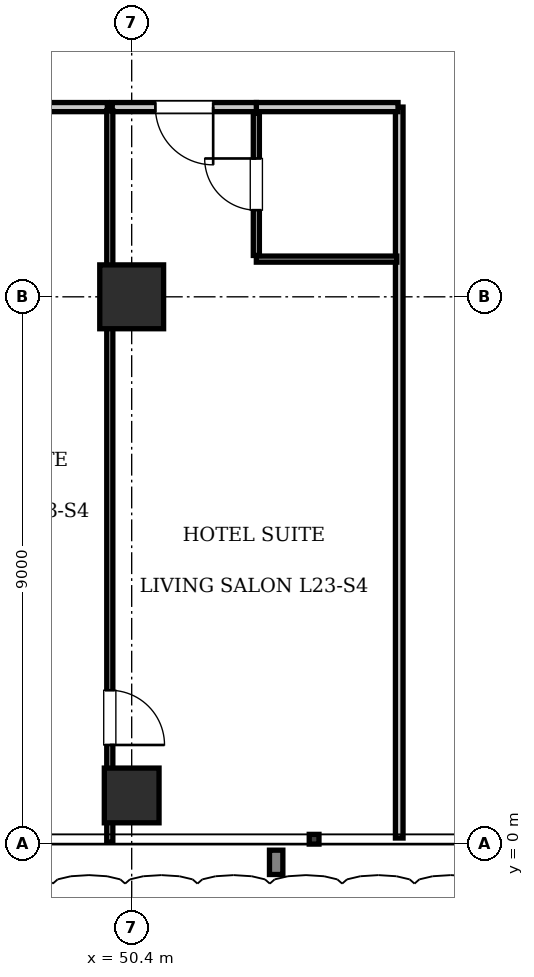
"""IFC4 building model, lengths in metres.
Left out: names, types, materials, properties, quantities, classifications, styles, units other than length and angle.
Written with IfcOpenShell. Run it as: python <this file> out.ifc"""

import sys

from ifc_helpers import new_model, si_unit, direction, frame, frame_2d, origin, origin_2d, place, context, subcontext, project, spatial, rectangle, extrude, element, fill, save


model = new_model("IFC4")
c1 = context("Model", 3, precision=1e-05, world=origin(), true_north=direction((0.0, 1.0)))
c2 = subcontext(c1, "Body", "Model", "MODEL_VIEW")
j1 = project(units=[si_unit("LENGTHUNIT", "METRE"), si_unit("PLANEANGLEUNIT", "RADIAN")], contexts=[c1])
p1 = place(None, origin())
s1 = spatial("IfcSite", under=j1, at=p1, CompositionType="ELEMENT")
p2 = place(p1, origin())
s2 = spatial("IfcBuilding", under=s1, at=p2, CompositionType="ELEMENT")
p3 = place(p2, frame((0.0, 0.0, 96.25)))
s3 = spatial("IfcBuildingStorey", under=s2, at=p3, CompositionType="ELEMENT", Elevation=96.25)
p4 = place(p3, frame((50.4, 9.0, 0.0), z_axis=(0.0, 0.0, 1.0), x_axis=(1.0, 0.0, 0.0)))
e1 = element("IfcColumn", 1, at=p4, inside=s3, PredefinedType="COLUMN", context=c2, shape_type="SweptSolid", body=[
    extrude(rectangle(XDim=1.05, YDim=1.05, at=origin_2d()), origin(), (0.0, 0.0, 1.0), 3.85),
])
p5 = place(p3, frame((50.4, 0.8, 0.0), z_axis=(0.0, 0.0, 1.0), x_axis=(1.0, 0.0, 0.0)))
e2 = element("IfcColumn", 2, at=p5, inside=s3, PredefinedType="COLUMN", context=c2, shape_type="SweptSolid", body=[
    extrude(rectangle(XDim=0.9, YDim=0.9, at=origin_2d()), origin(), (0.0, 0.0, 1.0), 3.85),
])
p6 = place(p3, frame((54.8, 0.1, 0.0), z_axis=(0.0, 0.0, 1.0), x_axis=(0.0, 1.0, 0.0)))
e3 = element("IfcWall", 3, at=p6, inside=s3, PredefinedType="PARTITIONING", context=c2, shape_type="SweptSolid", body=[
    extrude(rectangle(XDim=12.02, YDim=0.125, at=frame_2d((6.01, 0.0))), origin(), (0.0, 0.0, 1.0), 3.61),
])
p7 = place(p3, frame((52.45, 12.12, 0.0), z_axis=(0.0, 0.0, 1.0), x_axis=(1.0, 0.0, 0.0)))
e4 = element("IfcWall", 4, at=p7, inside=s3, PredefinedType="PARTITIONING", context=c2, shape_type="SweptSolid", body=[
    extrude(rectangle(XDim=2.33, YDim=0.15, at=frame_2d((1.165, 0.0))), origin(), (0.0, 0.0, 1.0), 3.61),
])
p8 = place(p3, frame((52.45, 9.62, 0.0), z_axis=(0.0, 0.0, 1.0), x_axis=(1.0, 0.0, 0.0)))
e5 = element("IfcWall", 5, at=p8, inside=s3, PredefinedType="PARTITIONING", context=c2, shape_type="SweptSolid", body=[
    extrude(rectangle(XDim=2.31, YDim=0.1, at=frame_2d((1.155, 0.0))), origin(), (0.0, 0.0, 1.0), 3.61),
])
p9 = place(p3, frame((52.45, 9.68, 0.0), z_axis=(0.0, 0.0, 1.0), x_axis=(0.0, 1.0, 0.0)))
e6 = element("IfcWall", 6, at=p9, inside=s3, PredefinedType="PARTITIONING", context=c2, shape_type="SweptSolid", body=[
    extrude(rectangle(XDim=2.34, YDim=0.1, at=frame_2d((1.17, 0.0))), origin(), (0.0, 0.0, 1.0), 3.61),
])
p10 = place(p9, frame((0.745, 0.0, 0.0)))
e7 = element("IfcOpeningElement", 7, at=p10, cuts=e6, PredefinedType="OPENING", context=c2, shape_type="SweptSolid", body=[
    extrude(rectangle(XDim=0.85, YDim=2.1, at=frame_2d((0.425, 1.05))), frame((0.0, 0.06, 0.0), z_axis=(0.0, -1.0, 0.0), x_axis=(1.0, 0.0, 0.0)), (0.0, 0.0, 1.0), 0.12),
])
p11 = place(p3, frame((46.32, 12.12, 0.0), z_axis=(0.0, 0.0, 1.0), x_axis=(1.0, 0.0, 0.0)))
e8 = element("IfcWall", 8, at=p11, inside=s3, PredefinedType="PARTITIONING", context=c2, shape_type="SweptSolid", body=[
    extrude(rectangle(XDim=3.68, YDim=0.15, at=frame_2d((1.84, 0.0))), origin(), (0.0, 0.0, 1.0), 3.61),
])
p12 = place(p3, frame((50.08, 12.12, 0.0), z_axis=(0.0, 0.0, 1.0), x_axis=(1.0, 0.0, 0.0)))
e9 = element("IfcWall", 9, at=p12, inside=s3, PredefinedType="PARTITIONING", context=c2, shape_type="SweptSolid", body=[
    extrude(rectangle(XDim=2.37, YDim=0.15, at=frame_2d((1.185, 0.0))), origin(), (0.0, 0.0, 1.0), 3.61),
])
p13 = place(p12, frame((0.71, 0.0, 0.0)))
e10 = element("IfcOpeningElement", 10, at=p13, cuts=e9, PredefinedType="OPENING", context=c2, shape_type="SweptSolid", body=[
    extrude(rectangle(XDim=0.95, YDim=2.15, at=frame_2d((0.475, 1.075))), frame((0.0, 0.085, 0.0), z_axis=(0.0, -1.0, 0.0), x_axis=(1.0, 0.0, 0.0)), (0.0, 0.0, 1.0), 0.17),
])
p14 = place(p3, frame((50.04, 0.03, 0.0), z_axis=(0.0, 0.0, 1.0), x_axis=(0.0, 1.0, 0.0)))
e11 = element("IfcWall", 11, at=p14, inside=s3, PredefinedType="PARTITIONING", context=c2, shape_type="SweptSolid", body=[
    extrude(rectangle(XDim=12.03, YDim=0.1, at=frame_2d((6.015, 0.0))), origin(), (0.0, 0.0, 1.0), 3.61),
])
p15 = place(p14, frame((1.6, 0.0, 0.0)))
e12 = element("IfcOpeningElement", 12, at=p15, cuts=e11, PredefinedType="OPENING", context=c2, shape_type="SweptSolid", body=[
    extrude(rectangle(XDim=0.9, YDim=2.1, at=frame_2d((0.45, 1.05))), frame((0.0, 0.06, 0.0), z_axis=(0.0, -1.0, 0.0), x_axis=(1.0, 0.0, 0.0)), (0.0, 0.0, 1.0), 0.12),
])
p16 = place(p10, origin())
e13 = element("IfcDoor", 13, at=p16, inside=s3, OperationType="SINGLE_SWING_RIGHT", PredefinedType="DOOR", context=c2, shape_type="SweptSolid", body=[
    extrude(rectangle(XDim=0.85, YDim=2.1, at=frame_2d((0.425, 1.05))), frame((0.0, 0.025, 0.0), z_axis=(0.0, -1.0, 0.0), x_axis=(1.0, 0.0, 0.0)), (0.0, 0.0, 1.0), 0.05),
])
fill(e7, e13)
p17 = place(p13, frame((0.95, 0.0, 0.0), z_axis=(0.0, 0.0, 1.0), x_axis=(-1.0, 0.0, 0.0)))
e14 = element("IfcDoor", 14, at=p17, inside=s3, OperationType="SINGLE_SWING_LEFT", PredefinedType="DOOR", context=c2, shape_type="SweptSolid", body=[
    extrude(rectangle(XDim=0.95, YDim=2.15, at=frame_2d((0.475, 1.075))), frame((0.0, 0.025, 0.0), z_axis=(0.0, -1.0, 0.0), x_axis=(1.0, 0.0, 0.0)), (0.0, 0.0, 1.0), 0.05),
])
fill(e10, e14)
p18 = place(p15, frame((0.9, 0.0, 0.0), z_axis=(0.0, 0.0, 1.0), x_axis=(-1.0, 0.0, 0.0)))
e15 = element("IfcDoor", 15, at=p18, inside=s3, OperationType="SINGLE_SWING_RIGHT", PredefinedType="DOOR", context=c2, shape_type="SweptSolid", body=[
    extrude(rectangle(XDim=0.9, YDim=2.1, at=frame_2d((0.45, 1.05))), frame((0.0, 0.025, 0.0), z_axis=(0.0, -1.0, 0.0), x_axis=(1.0, 0.0, 0.0)), (0.0, 0.0, 1.0), 0.05),
])
fill(e12, e15)
save(model, sys.argv[1])
